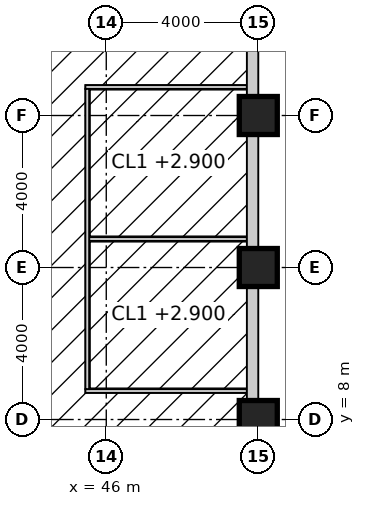
"""IFC4 building model, lengths in metres.
Left out: names, types, materials, properties, quantities, classifications, styles, units other than length and angle.
Written with IfcOpenShell. Run it as: python <this file> out.ifc"""

import sys

from ifc_helpers import new_model, si_unit, direction, frame, frame_2d, origin, origin_2d, place, context, subcontext, project, spatial, rectangle, hollow_rectangle, extrude, element, fill, save


model = new_model("IFC4")
c1 = context("Model", 3, precision=1e-05, world=origin(), true_north=direction((0.0, 1.0)))
c2 = subcontext(c1, "Body", "Model", "MODEL_VIEW")
j1 = project(units=[si_unit("LENGTHUNIT", "METRE"), si_unit("PLANEANGLEUNIT", "RADIAN")], contexts=[c1])
p1 = place(None, origin())
s1 = spatial("IfcSite", under=j1, at=p1, CompositionType="ELEMENT")
p2 = place(p1, origin())
s2 = spatial("IfcBuilding", under=s1, at=p2, CompositionType="ELEMENT")
p3 = place(p2, frame((0.0, 0.0, 254.2)))
s3 = spatial("IfcBuildingStorey", under=s2, at=p3, CompositionType="ELEMENT", Elevation=254.2)
for number, where, z_axis, x_axis in (
    (1, (50.0, 8.0, 0.0), (0.0, 0.0, 1.0), (1.0, 0.0, 0.0)),
    (2, (50.0, 12.0, 0.0), (0.0, 0.0, 1.0), (1.0, 0.0, 0.0)),
    (3, (50.0, 16.0, 0.0), (0.0, 0.0, 1.0), (1.0, 0.0, 0.0)),
):
    element("IfcColumn", number, at=place(p3, frame(where, z_axis=z_axis, x_axis=x_axis)), inside=s3, PredefinedType="COLUMN", context=c2, shape_type="SweptSolid", body=[
        extrude(hollow_rectangle(XDim=1.0, YDim=1.0, WallThickness=0.1, at=origin_2d()), origin(), (0.0, 0.0, 1.0), 4.0),
    ])
p4 = place(p3, frame((45.45, 8.75, 0.0), z_axis=(0.0, 0.0, 1.0), x_axis=(1.0, 0.0, 0.0)))
e4 = element("IfcWall", 4, at=p4, inside=s3, PredefinedType="PARTITIONING", context=c2, shape_type="SweptSolid", body=[
    extrude(rectangle(XDim=4.25, YDim=0.1, at=frame_2d((2.125, 0.0))), origin(), (0.0, 0.0, 1.0), 3.85),
])
p5 = place(p3, frame((45.55, 12.75, 0.0), z_axis=(0.0, 0.0, 1.0), x_axis=(1.0, 0.0, 0.0)))
e5 = element("IfcWall", 5, at=p5, inside=s3, PredefinedType="PARTITIONING", context=c2, shape_type="SweptSolid", body=[
    extrude(rectangle(XDim=4.15, YDim=0.1, at=frame_2d((2.075, 0.0))), origin(), (0.0, 0.0, 1.0), 3.85),
])
p6 = place(p3, frame((45.45, 16.75, 0.0), z_axis=(0.0, 0.0, 1.0), x_axis=(1.0, 0.0, 0.0)))
e6 = element("IfcWall", 6, at=p6, inside=s3, PredefinedType="PARTITIONING", context=c2, shape_type="SweptSolid", body=[
    extrude(rectangle(XDim=4.25, YDim=0.1, at=frame_2d((2.125, 0.0))), origin(), (0.0, 0.0, 1.0), 3.85),
])
p7 = place(p3, frame((45.5, 8.8, 0.0), z_axis=(0.0, 0.0, 1.0), x_axis=(0.0, 1.0, 0.0)))
e7 = element("IfcWall", 7, at=p7, inside=s3, PredefinedType="PARTITIONING", context=c2, shape_type="SweptSolid", body=[
    extrude(rectangle(XDim=7.9, YDim=0.1, at=frame_2d((3.95, 0.0))), origin(), (0.0, 0.0, 1.0), 3.85),
])
p8 = place(p7, frame((1.45, 0.0, 0.0)))
e8 = element("IfcOpeningElement", 8, at=p8, cuts=e7, PredefinedType="OPENING", context=c2, shape_type="SweptSolid", body=[
    extrude(rectangle(XDim=1.0, YDim=2.2, at=frame_2d((0.5, 1.1))), frame((0.0, 0.06, 0.0), z_axis=(0.0, -1.0, 0.0), x_axis=(1.0, 0.0, 0.0)), (0.0, 0.0, 1.0), 0.12),
])
p9 = place(p7, frame((5.45, 0.0, 0.0)))
e9 = element("IfcOpeningElement", 9, at=p9, cuts=e7, PredefinedType="OPENING", context=c2, shape_type="SweptSolid", body=[
    extrude(rectangle(XDim=1.0, YDim=2.2, at=frame_2d((0.5, 1.1))), frame((0.0, 0.06, 0.0), z_axis=(0.0, -1.0, 0.0), x_axis=(1.0, 0.0, 0.0)), (0.0, 0.0, 1.0), 0.12),
])
p10 = place(p3, frame((49.85, 8.5, 0.0), z_axis=(0.0, 0.0, 1.0), x_axis=(0.0, 1.0, 0.0)))
e10 = element("IfcWall", 10, at=p10, inside=s3, PredefinedType="ELEMENTEDWALL", context=c2, shape_type="SweptSolid", body=[
    extrude(rectangle(XDim=3.0, YDim=0.3, at=frame_2d((1.5, 0.0))), origin(), (0.0, 0.0, 1.0), 2.85),
])
p11 = place(p10, frame((0.5, 0.0, 0.8)))
e11 = element("IfcOpeningElement", 11, at=p11, cuts=e10, PredefinedType="OPENING", context=c2, shape_type="SweptSolid", body=[
    extrude(rectangle(XDim=2.0, YDim=2.0, at=frame_2d((1.0, 1.0))), frame((0.0, 0.16, 0.0), z_axis=(0.0, -1.0, 0.0), x_axis=(1.0, 0.0, 0.0)), (0.0, 0.0, 1.0), 0.32),
])
p12 = place(p3, frame((49.85, 12.5, 0.0), z_axis=(0.0, 0.0, 1.0), x_axis=(0.0, 1.0, 0.0)))
e12 = element("IfcWall", 12, at=p12, inside=s3, PredefinedType="ELEMENTEDWALL", context=c2, shape_type="SweptSolid", body=[
    extrude(rectangle(XDim=3.0, YDim=0.3, at=frame_2d((1.5, 0.0))), origin(), (0.0, 0.0, 1.0), 2.85),
])
p13 = place(p12, frame((0.5, 0.0, 0.8)))
e13 = element("IfcOpeningElement", 13, at=p13, cuts=e12, PredefinedType="OPENING", context=c2, shape_type="SweptSolid", body=[
    extrude(rectangle(XDim=2.0, YDim=2.0, at=frame_2d((1.0, 1.0))), frame((0.0, 0.16, 0.0), z_axis=(0.0, -1.0, 0.0), x_axis=(1.0, 0.0, 0.0)), (0.0, 0.0, 1.0), 0.32),
])
p14 = place(p3, frame((49.85, 16.5, 0.0), z_axis=(0.0, 0.0, 1.0), x_axis=(0.0, 1.0, 0.0)))
e14 = element("IfcWall", 14, at=p14, inside=s3, PredefinedType="ELEMENTEDWALL", context=c2, shape_type="SweptSolid", body=[
    extrude(rectangle(XDim=3.0, YDim=0.3, at=frame_2d((1.5, 0.0))), origin(), (0.0, 0.0, 1.0), 2.85),
])
p15 = place(p14, frame((0.5, 0.0, 0.8)))
e15 = element("IfcOpeningElement", 15, at=p15, cuts=e14, PredefinedType="OPENING", context=c2, shape_type="SweptSolid", body=[
    extrude(rectangle(XDim=2.0, YDim=2.0, at=frame_2d((1.0, 1.0))), frame((0.0, 0.16, 0.0), z_axis=(0.0, -1.0, 0.0), x_axis=(1.0, 0.0, 0.0)), (0.0, 0.0, 1.0), 0.32),
])
p16 = place(p8, origin())
e16 = element("IfcDoor", 16, at=p16, inside=s3, OperationType="SINGLE_SWING_LEFT", PredefinedType="DOOR", context=c2, shape_type="SweptSolid", body=[
    extrude(rectangle(XDim=1.0, YDim=2.2, at=frame_2d((0.5, 1.1))), frame((0.0, 0.025, 0.0), z_axis=(0.0, -1.0, 0.0), x_axis=(1.0, 0.0, 0.0)), (0.0, 0.0, 1.0), 0.05),
])
fill(e8, e16)
p17 = place(p9, origin())
e17 = element("IfcDoor", 17, at=p17, inside=s3, OperationType="SINGLE_SWING_LEFT", PredefinedType="DOOR", context=c2, shape_type="SweptSolid", body=[
    extrude(rectangle(XDim=1.0, YDim=2.2, at=frame_2d((0.5, 1.1))), frame((0.0, 0.025, 0.0), z_axis=(0.0, -1.0, 0.0), x_axis=(1.0, 0.0, 0.0)), (0.0, 0.0, 1.0), 0.05),
])
fill(e9, e17)
p18 = place(p11, origin())
e18 = element("IfcWindow", 18, at=p18, inside=s3, PartitioningType="SINGLE_PANEL", PredefinedType="WINDOW", context=c2, shape_type="SweptSolid", body=[
    extrude(rectangle(XDim=2.0, YDim=2.0, at=frame_2d((1.0, 1.0))), frame((0.0, 0.03, 0.0), z_axis=(0.0, -1.0, 0.0), x_axis=(1.0, 0.0, 0.0)), (0.0, 0.0, 1.0), 0.06),
])
fill(e11, e18)
p19 = place(p13, origin())
e19 = element("IfcWindow", 19, at=p19, inside=s3, PartitioningType="SINGLE_PANEL", PredefinedType="WINDOW", context=c2, shape_type="SweptSolid", body=[
    extrude(rectangle(XDim=2.0, YDim=2.0, at=frame_2d((1.0, 1.0))), frame((0.0, 0.03, 0.0), z_axis=(0.0, -1.0, 0.0), x_axis=(1.0, 0.0, 0.0)), (0.0, 0.0, 1.0), 0.06),
])
fill(e13, e19)
p20 = place(p15, origin())
e20 = element("IfcWindow", 20, at=p20, inside=s3, PartitioningType="SINGLE_PANEL", PredefinedType="WINDOW", context=c2, shape_type="SweptSolid", body=[
    extrude(rectangle(XDim=2.0, YDim=2.0, at=frame_2d((1.0, 1.0))), frame((0.0, 0.03, 0.0), z_axis=(0.0, -1.0, 0.0), x_axis=(1.0, 0.0, 0.0)), (0.0, 0.0, 1.0), 0.06),
])
fill(e15, e20)
save(model, sys.argv[1])
